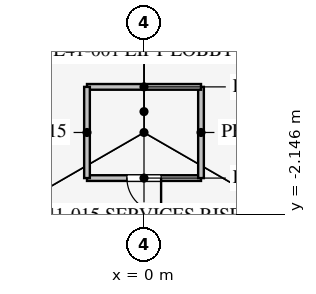
"""IFC4 building model, lengths in metres.
Left out: names, types, materials, properties, quantities, classifications, styles, units other than length and angle.
Written with IfcOpenShell. Run it as: python <this file> out.ifc"""

import sys

from ifc_helpers import new_model, si_unit, direction, frame, frame_2d, origin, place, context, subcontext, project, spatial, rectangle, extrude, element, fill, save


model = new_model("IFC4")
c1 = context("Model", 3, precision=1e-05, world=origin(), true_north=direction((0.0, 1.0)))
c2 = subcontext(c1, "Body", "Model", "MODEL_VIEW")
j1 = project(units=[si_unit("LENGTHUNIT", "METRE"), si_unit("PLANEANGLEUNIT", "RADIAN")], contexts=[c1])
p1 = place(None, origin())
s1 = spatial("IfcSite", under=j1, at=p1, CompositionType="ELEMENT")
p2 = place(p1, origin())
s2 = spatial("IfcBuilding", under=s1, at=p2, CompositionType="ELEMENT")
p3 = place(p2, frame((0.0, 0.0, 178.7)))
s3 = spatial("IfcBuildingStorey", under=s2, at=p3, CompositionType="ELEMENT", Elevation=178.7)
p4 = place(p3, frame((-1.5, -1.2, 0.0), z_axis=(0.0, 0.0, 1.0), x_axis=(1.0, 0.0, 0.0)))
e1 = element("IfcWall", 1, at=p4, inside=s3, PredefinedType="PARTITIONING", context=c2, shape_type="SweptSolid", body=[
    extrude(rectangle(XDim=3.0, YDim=0.15, at=frame_2d((1.5, 0.0))), origin(), (0.0, 0.0, 1.0), 5.8),
])
p5 = place(p4, frame((1.05, 0.0, 0.0)))
e2 = element("IfcOpeningElement", 2, at=p5, cuts=e1, PredefinedType="OPENING", context=c2, shape_type="SweptSolid", body=[
    extrude(rectangle(XDim=0.9, YDim=2.1, at=frame_2d((0.45, 1.05))), frame((0.0, 0.085, 0.0), z_axis=(0.0, -1.0, 0.0), x_axis=(1.0, 0.0, 0.0)), (0.0, 0.0, 1.0), 0.17),
])
p6 = place(p3, frame((1.5, -1.2, 0.0), z_axis=(0.0, 0.0, 1.0), x_axis=(0.0, 1.0, 0.0)))
e3 = element("IfcWall", 3, at=p6, inside=s3, PredefinedType="PARTITIONING", context=c2, shape_type="SweptSolid", body=[
    extrude(rectangle(XDim=2.4, YDim=0.15, at=frame_2d((1.2, 0.0))), origin(), (0.0, 0.0, 1.0), 5.8),
])
p7 = place(p3, frame((1.5, 1.2, 0.0), z_axis=(0.0, 0.0, 1.0), x_axis=(-1.0, 0.0, 0.0)))
e4 = element("IfcWall", 4, at=p7, inside=s3, PredefinedType="PARTITIONING", context=c2, shape_type="SweptSolid", body=[
    extrude(rectangle(XDim=3.0, YDim=0.15, at=frame_2d((1.5, 0.0))), origin(), (0.0, 0.0, 1.0), 5.8),
])
p8 = place(p3, frame((-1.5, 1.2, 0.0), z_axis=(0.0, 0.0, 1.0), x_axis=(0.0, -1.0, 0.0)))
e5 = element("IfcWall", 5, at=p8, inside=s3, PredefinedType="PARTITIONING", context=c2, shape_type="SweptSolid", body=[
    extrude(rectangle(XDim=2.4, YDim=0.15, at=frame_2d((1.2, 0.0))), origin(), (0.0, 0.0, 1.0), 5.8),
])
p9 = place(p5, frame((0.9, 0.0, 0.0), z_axis=(0.0, 0.0, 1.0), x_axis=(-1.0, 0.0, 0.0)))
e6 = element("IfcDoor", 6, at=p9, inside=s3, OperationType="SINGLE_SWING_LEFT", PredefinedType="DOOR", context=c2, shape_type="SweptSolid", body=[
    extrude(rectangle(XDim=0.9, YDim=2.1, at=frame_2d((0.45, 1.05))), frame((0.0, 0.025, 0.0), z_axis=(0.0, -1.0, 0.0), x_axis=(1.0, 0.0, 0.0)), (0.0, 0.0, 1.0), 0.05),
])
fill(e2, e6)
save(model, sys.argv[1])
